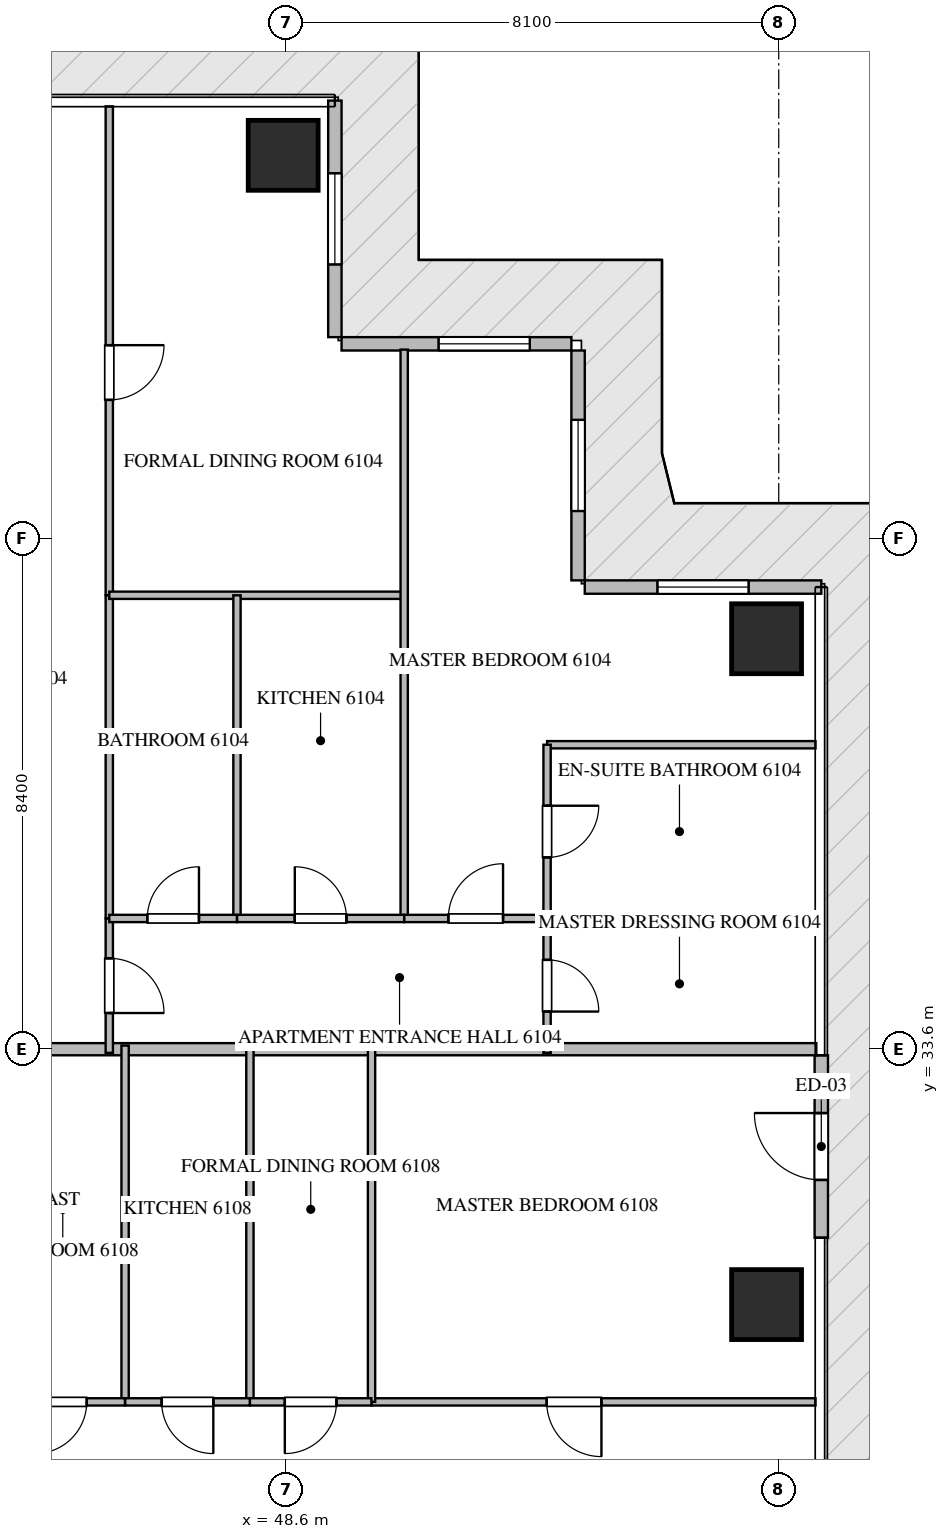
"""IFC4 building model, lengths in metres.
Left out: names, types, materials, properties, quantities, classifications, styles, units other than length and angle.
Written with IfcOpenShell. Run it as: python <this file> out.ifc"""

import sys

from ifc_helpers import new_model, si_unit, direction, frame, frame_2d, origin, origin_2d, place, context, subcontext, project, spatial, rectangle, extrude, source, transform, mapped, element, fill, save


model = new_model("IFC4")
c1 = context("Model", 3, precision=1e-05, world=origin(), true_north=direction((0.0, 1.0)))
c2 = subcontext(c1, "Body", "Model", "MODEL_VIEW")
j1 = project(units=[si_unit("LENGTHUNIT", "METRE"), si_unit("PLANEANGLEUNIT", "RADIAN")], contexts=[c1])
p1 = place(None, origin())
s1 = spatial("IfcSite", under=j1, at=p1, CompositionType="ELEMENT")
p2 = place(p1, origin())
s2 = spatial("IfcBuilding", under=s1, at=p2, CompositionType="ELEMENT")
p3 = place(p2, frame((0.0, 0.0, 245.1)))
s3 = spatial("IfcBuildingStorey", under=s2, at=p3, CompositionType="ELEMENT", Elevation=245.1)
m1 = source(origin(), c2, "Body", "SweptSolid", [
    extrude(rectangle(XDim=1.15, YDim=1.15, at=origin_2d()), origin(), (0.0, 0.0, 1.0), 3.85),
])
for number, where, z_axis, x_axis in (
    (1, (48.55, 48.3, -0.26), (0.0, 0.0, 1.0), (1.0, 0.0, 0.0)),
    (2, (56.5, 29.4, -0.26), (0.0, 0.0, 1.0), (1.0, 0.0, 0.0)),
    (3, (56.5, 40.35, -0.26), (0.0, 0.0, 1.0), (1.0, 0.0, 0.0)),
):
    element("IfcColumn", number, at=place(p3, frame(where, z_axis=z_axis, x_axis=x_axis)), inside=s3, PredefinedType="COLUMN", context=c2, shape_type="MappedRepresentation", body=[
        mapped(m1, transform((0.0, 0.0, 0.0), scale=1.0)),
    ])
p4 = place(p3, frame((57.4, 30.5, 0.0), z_axis=(0.0, 0.0, 1.0), x_axis=(0.0, 1.0, 0.0)))
e4 = element("IfcWall", 4, at=p4, inside=s3, PredefinedType="ELEMENTEDWALL", context=c2, shape_type="SweptSolid", body=[
    extrude(rectangle(XDim=3.0, YDim=0.22, at=frame_2d((1.5, 0.0))), origin(), (0.0, 0.0, 1.0), 3.575),
])
p5 = place(p4, frame((0.95, 0.0, 0.0)))
e5 = element("IfcOpeningElement", 5, at=p5, cuts=e4, PredefinedType="OPENING", context=c2, shape_type="SweptSolid", body=[
    extrude(rectangle(XDim=1.1, YDim=2.2, at=frame_2d((0.55, 1.1))), frame((0.0, 0.12, 0.0), z_axis=(0.0, -1.0, 0.0), x_axis=(1.0, 0.0, 0.0)), (0.0, 0.0, 1.0), 0.24),
])
p6 = place(p3, frame((57.4, 41.2, 0.0), z_axis=(0.0, 0.0, 1.0), x_axis=(-1.0, 0.0, 0.0)))
e6 = element("IfcWall", 6, at=p6, inside=s3, PredefinedType="ELEMENTEDWALL", context=c2, shape_type="SweptSolid", body=[
    extrude(rectangle(XDim=3.89, YDim=0.22, at=frame_2d((1.945, 0.0))), origin(), (0.0, 0.0, 1.0), 3.575),
])
p7 = place(p6, frame((1.195, 0.0, 0.65)))
e7 = element("IfcOpeningElement", 7, at=p7, cuts=e6, PredefinedType="OPENING", context=c2, shape_type="SweptSolid", body=[
    extrude(rectangle(XDim=1.5, YDim=2.25, at=frame_2d((0.75, 1.125))), frame((0.0, 0.12, 0.0), z_axis=(0.0, -1.0, 0.0), x_axis=(1.0, 0.0, 0.0)), (0.0, 0.0, 1.0), 0.24),
])
p8 = place(p3, frame((53.4, 41.31, 0.0), z_axis=(0.0, 0.0, 1.0), x_axis=(0.0, 1.0, 0.0)))
e8 = element("IfcWall", 8, at=p8, inside=s3, PredefinedType="ELEMENTEDWALL", context=c2, shape_type="SweptSolid", body=[
    extrude(rectangle(XDim=3.78, YDim=0.22, at=frame_2d((1.89, 0.0))), origin(), (0.0, 0.0, 1.0), 3.575),
])
p9 = place(p8, frame((1.14, 0.0, 0.65)))
e9 = element("IfcOpeningElement", 9, at=p9, cuts=e8, PredefinedType="OPENING", context=c2, shape_type="SweptSolid", body=[
    extrude(rectangle(XDim=1.5, YDim=2.25, at=frame_2d((0.75, 1.125))), frame((0.0, 0.12, 0.0), z_axis=(0.0, -1.0, 0.0), x_axis=(1.0, 0.0, 0.0)), (0.0, 0.0, 1.0), 0.24),
])
p10 = place(p3, frame((53.29, 45.2, 0.0), z_axis=(0.0, 0.0, 1.0), x_axis=(-1.0, 0.0, 0.0)))
e10 = element("IfcWall", 10, at=p10, inside=s3, PredefinedType="ELEMENTEDWALL", context=c2, shape_type="SweptSolid", body=[
    extrude(rectangle(XDim=3.78, YDim=0.22, at=frame_2d((1.89, 0.0))), origin(), (0.0, 0.0, 1.0), 3.575),
])
p11 = place(p10, frame((0.684, 0.0, 0.65)))
e11 = element("IfcOpeningElement", 11, at=p11, cuts=e10, PredefinedType="OPENING", context=c2, shape_type="SweptSolid", body=[
    extrude(rectangle(XDim=1.5, YDim=2.25, at=frame_2d((0.75, 1.125))), frame((0.0, 0.12, 0.0), z_axis=(0.0, -1.0, 0.0), x_axis=(1.0, 0.0, 0.0)), (0.0, 0.0, 1.0), 0.24),
])
p12 = place(p3, frame((49.4, 45.31, 0.0), z_axis=(0.0, 0.0, 1.0), x_axis=(0.0, 1.0, 0.0)))
e12 = element("IfcWall", 12, at=p12, inside=s3, PredefinedType="ELEMENTEDWALL", context=c2, shape_type="SweptSolid", body=[
    extrude(rectangle(XDim=3.89, YDim=0.22, at=frame_2d((1.945, 0.0))), origin(), (0.0, 0.0, 1.0), 3.575),
])
p13 = place(p12, frame((1.195, 0.0, 0.65)))
e13 = element("IfcOpeningElement", 13, at=p13, cuts=e12, PredefinedType="OPENING", context=c2, shape_type="SweptSolid", body=[
    extrude(rectangle(XDim=1.5, YDim=2.25, at=frame_2d((0.75, 1.125))), frame((0.0, 0.12, 0.0), z_axis=(0.0, -1.0, 0.0), x_axis=(1.0, 0.0, 0.0)), (0.0, 0.0, 1.0), 0.24),
])
p14 = place(p3, frame((43.9, 33.6, 0.0), z_axis=(0.0, 0.0, 1.0), x_axis=(1.0, 0.0, 0.0)))
e14 = element("IfcWall", 14, at=p14, inside=s3, PredefinedType="PARTITIONING", context=c2, shape_type="SweptSolid", body=[
    extrude(rectangle(XDim=13.418, YDim=0.2, at=frame_2d((6.709, 0.0))), origin(), (0.0, 0.0, 1.0), 3.59),
])
p15 = place(p3, frame((45.69, 35.75, 0.0), z_axis=(0.0, 0.0, 1.0), x_axis=(0.0, -1.0, 0.0)))
e15 = element("IfcWall", 15, at=p15, inside=s3, PredefinedType="PARTITIONING", context=c2, shape_type="SweptSolid", body=[
    extrude(rectangle(XDim=2.21, YDim=0.12, at=frame_2d((1.105, 0.0))), origin(), (0.0, 0.0, 1.0), 3.59),
])
p16 = place(p15, frame((0.655, 0.0, 0.0)))
e16 = element("IfcOpeningElement", 16, at=p16, cuts=e15, PredefinedType="OPENING", context=c2, shape_type="SweptSolid", body=[
    extrude(rectangle(XDim=0.9, YDim=2.1, at=frame_2d((0.45, 1.05))), frame((0.0, 0.07, 0.0), z_axis=(0.0, -1.0, 0.0), x_axis=(1.0, 0.0, 0.0)), (0.0, 0.0, 1.0), 0.14),
])
p17 = place(p3, frame((45.69, 49.105, 0.0), z_axis=(0.0, 0.0, 1.0), x_axis=(0.0, -1.0, 0.0)))
e17 = element("IfcWall", 17, at=p17, inside=s3, PredefinedType="PARTITIONING", context=c2, shape_type="SweptSolid", body=[
    extrude(rectangle(XDim=8.04, YDim=0.12, at=frame_2d((4.02, 0.0))), origin(), (0.0, 0.0, 1.0), 3.59),
])
p18 = place(p17, frame((3.927, 0.0, 0.0)))
e18 = element("IfcOpeningElement", 18, at=p18, cuts=e17, PredefinedType="OPENING", context=c2, shape_type="SweptSolid", body=[
    extrude(rectangle(XDim=0.9, YDim=2.1, at=frame_2d((0.45, 1.05))), frame((0.0, 0.07, 0.0), z_axis=(0.0, -1.0, 0.0), x_axis=(1.0, 0.0, 0.0)), (0.0, 0.0, 1.0), 0.14),
])
p19 = place(p3, frame((45.69, 41.063, 0.0), z_axis=(0.0, 0.0, 1.0), x_axis=(0.0, -1.0, 0.0)))
e19 = element("IfcWall", 19, at=p19, inside=s3, PredefinedType="PARTITIONING", context=c2, shape_type="SweptSolid", body=[
    extrude(rectangle(XDim=5.311, YDim=0.12, at=frame_2d((2.656, 0.0))), origin(), (0.0, 0.0, 1.0), 3.59),
])
p20 = place(p3, frame((45.69, 41.065, 0.0), z_axis=(0.0, 0.0, 1.0), x_axis=(1.0, 0.0, 0.0)))
e20 = element("IfcWall", 20, at=p20, inside=s3, PredefinedType="PARTITIONING", context=c2, shape_type="SweptSolid", body=[
    extrude(rectangle(XDim=4.85, YDim=0.12, at=frame_2d((2.425, 0.0))), origin(), (0.0, 0.0, 1.0), 3.59),
])
p21 = place(p3, frame((50.54, 45.105, 0.0), z_axis=(0.0, 0.0, 1.0), x_axis=(0.0, -1.0, 0.0)))
e21 = element("IfcWall", 21, at=p21, inside=s3, PredefinedType="PARTITIONING", context=c2, shape_type="SweptSolid", body=[
    extrude(rectangle(XDim=9.355, YDim=0.12, at=frame_2d((4.677, 0.0))), origin(), (0.0, 0.0, 1.0), 3.59),
])
p22 = place(p3, frame((47.79, 41.065, 0.0), z_axis=(0.0, 0.0, 1.0), x_axis=(0.0, -1.0, 0.0)))
e22 = element("IfcWall", 22, at=p22, inside=s3, PredefinedType="PARTITIONING", context=c2, shape_type="SweptSolid", body=[
    extrude(rectangle(XDim=5.315, YDim=0.12, at=frame_2d((2.657, 0.0))), origin(), (0.0, 0.0, 1.0), 3.59),
])
p23 = place(p3, frame((45.69, 35.75, 0.0), z_axis=(0.0, 0.0, 1.0), x_axis=(1.0, 0.0, 0.0)))
e23 = element("IfcWall", 23, at=p23, inside=s3, PredefinedType="PARTITIONING", context=c2, shape_type="SweptSolid", body=[
    extrude(rectangle(XDim=2.1, YDim=0.12, at=frame_2d((1.05, 0.0))), origin(), (0.0, 0.0, 1.0), 3.59),
])
p24 = place(p23, frame((0.625, 0.0, 0.0)))
e24 = element("IfcOpeningElement", 24, at=p24, cuts=e23, PredefinedType="OPENING", context=c2, shape_type="SweptSolid", body=[
    extrude(rectangle(XDim=0.85, YDim=2.1, at=frame_2d((0.425, 1.05))), frame((0.0, 0.07, 0.0), z_axis=(0.0, -1.0, 0.0), x_axis=(1.0, 0.0, 0.0)), (0.0, 0.0, 1.0), 0.14),
])
p25 = place(p3, frame((47.792, 35.75, 0.0), z_axis=(0.0, 0.0, 1.0), x_axis=(1.0, 0.0, 0.0)))
e25 = element("IfcWall", 25, at=p25, inside=s3, PredefinedType="PARTITIONING", context=c2, shape_type="SweptSolid", body=[
    extrude(rectangle(XDim=2.748, YDim=0.12, at=frame_2d((1.374, 0.0))), origin(), (0.0, 0.0, 1.0), 3.59),
])
p26 = place(p25, frame((0.949, 0.0, 0.0)))
e26 = element("IfcOpeningElement", 26, at=p26, cuts=e25, PredefinedType="OPENING", context=c2, shape_type="SweptSolid", body=[
    extrude(rectangle(XDim=0.85, YDim=2.1, at=frame_2d((0.425, 1.05))), frame((0.0, 0.07, 0.0), z_axis=(0.0, -1.0, 0.0), x_axis=(1.0, 0.0, 0.0)), (0.0, 0.0, 1.0), 0.14),
])
p27 = place(p3, frame((50.542, 35.75, 0.0), z_axis=(0.0, 0.0, 1.0), x_axis=(1.0, 0.0, 0.0)))
e27 = element("IfcWall", 27, at=p27, inside=s3, PredefinedType="PARTITIONING", context=c2, shape_type="SweptSolid", body=[
    extrude(rectangle(XDim=2.348, YDim=0.12, at=frame_2d((1.174, 0.0))), origin(), (0.0, 0.0, 1.0), 3.59),
])
p28 = place(p27, frame((0.724, 0.0, 0.0)))
e28 = element("IfcOpeningElement", 28, at=p28, cuts=e27, PredefinedType="OPENING", context=c2, shape_type="SweptSolid", body=[
    extrude(rectangle(XDim=0.9, YDim=2.1, at=frame_2d((0.45, 1.05))), frame((0.0, 0.07, 0.0), z_axis=(0.0, -1.0, 0.0), x_axis=(1.0, 0.0, 0.0)), (0.0, 0.0, 1.0), 0.14),
])
p29 = place(p3, frame((52.89, 38.607, 0.0), z_axis=(0.0, 0.0, 1.0), x_axis=(1.0, 0.0, 0.0)))
e29 = element("IfcWall", 29, at=p29, inside=s3, PredefinedType="PARTITIONING", context=c2, shape_type="SweptSolid", body=[
    extrude(rectangle(XDim=4.415, YDim=0.12, at=frame_2d((2.208, 0.0))), origin(), (0.0, 0.0, 1.0), 3.59),
])
p30 = place(p3, frame((52.892, 35.75, 0.0), z_axis=(0.0, 0.0, 1.0), x_axis=(1.0, 0.0, 0.0)))
e30 = element("IfcWall", 30, at=p30, inside=s3, PredefinedType="PARTITIONING", context=c2, shape_type="SweptSolid", body=[
    extrude(rectangle(XDim=4.413, YDim=0.12, at=frame_2d((2.207, 0.0))), origin(), (0.0, 0.0, 1.0), 3.59),
])
p31 = place(p3, frame((52.89, 38.607, 0.0), z_axis=(0.0, 0.0, 1.0), x_axis=(0.0, -1.0, 0.0)))
e31 = element("IfcWall", 31, at=p31, inside=s3, PredefinedType="PARTITIONING", context=c2, shape_type="SweptSolid", body=[
    extrude(rectangle(XDim=2.857, YDim=0.12, at=frame_2d((1.428, 0.0))), origin(), (0.0, 0.0, 1.0), 3.59),
])
p32 = place(p31, frame((1.003, 0.0, 0.0)))
e32 = element("IfcOpeningElement", 32, at=p32, cuts=e31, PredefinedType="OPENING", context=c2, shape_type="SweptSolid", body=[
    extrude(rectangle(XDim=0.85, YDim=2.1, at=frame_2d((0.425, 1.05))), frame((0.0, 0.07, 0.0), z_axis=(0.0, -1.0, 0.0), x_axis=(1.0, 0.0, 0.0)), (0.0, 0.0, 1.0), 0.14),
])
p33 = place(p3, frame((52.89, 35.748, 0.0), z_axis=(0.0, 0.0, 1.0), x_axis=(0.0, -1.0, 0.0)))
e33 = element("IfcWall", 33, at=p33, inside=s3, PredefinedType="PARTITIONING", context=c2, shape_type="SweptSolid", body=[
    extrude(rectangle(XDim=2.208, YDim=0.12, at=frame_2d((1.104, 0.0))), origin(), (0.0, 0.0, 1.0), 3.59),
])
p34 = place(p33, frame((0.679, 0.0, 0.0)))
e34 = element("IfcOpeningElement", 34, at=p34, cuts=e33, PredefinedType="OPENING", context=c2, shape_type="SweptSolid", body=[
    extrude(rectangle(XDim=0.85, YDim=2.1, at=frame_2d((0.425, 1.05))), frame((0.0, 0.07, 0.0), z_axis=(0.0, -1.0, 0.0), x_axis=(1.0, 0.0, 0.0)), (0.0, 0.0, 1.0), 0.14),
])
p35 = place(p3, frame((57.305, 27.8, 0.0), z_axis=(0.0, 0.0, 1.0), x_axis=(-1.0, 0.0, 0.0)))
e35 = element("IfcWall", 35, at=p35, inside=s3, PredefinedType="PARTITIONING", context=c2, shape_type="SweptSolid", body=[
    extrude(rectangle(XDim=7.302, YDim=0.12, at=frame_2d((3.651, 0.0))), origin(), (0.0, 0.0, 1.0), 3.59),
])
p36 = place(p35, frame((3.521, 0.0, 0.0)))
e36 = element("IfcOpeningElement", 36, at=p36, cuts=e35, PredefinedType="OPENING", context=c2, shape_type="SweptSolid", body=[
    extrude(rectangle(XDim=0.9, YDim=2.1, at=frame_2d((0.45, 1.05))), frame((0.0, 0.07, 0.0), z_axis=(0.0, -1.0, 0.0), x_axis=(1.0, 0.0, 0.0)), (0.0, 0.0, 1.0), 0.14),
])
for number, where, z_axis, x_axis in (
    (37, (50.003, 27.8, 0.0), (0.0, 0.0, 1.0), (0.0, 1.0, 0.0)),
    (38, (48.003, 27.8, 0.0), (0.0, 0.0, 1.0), (0.0, 1.0, 0.0)),
    (39, (45.95, 27.8, 0.0), (0.0, 0.0, 1.0), (0.0, 1.0, 0.0)),
):
    element("IfcWall", number, at=place(p3, frame(where, z_axis=z_axis, x_axis=x_axis)), inside=s3, PredefinedType="PARTITIONING", context=c2, shape_type="SweptSolid", body=[
        extrude(rectangle(XDim=5.86, YDim=0.12, at=frame_2d((2.93, 0.0))), origin(), (0.0, 0.0, 1.0), 3.59),
    ])
p37 = place(p3, frame((50.001, 27.8, 0.0), z_axis=(0.0, 0.0, 1.0), x_axis=(-1.0, 0.0, 0.0)))
e40 = element("IfcWall", 40, at=p37, inside=s3, PredefinedType="PARTITIONING", context=c2, shape_type="SweptSolid", body=[
    extrude(rectangle(XDim=1.998, YDim=0.12, at=frame_2d((0.999, 0.0))), origin(), (0.0, 0.0, 1.0), 3.59),
])
p38 = place(p37, frame((0.574, 0.0, 0.0)))
e41 = element("IfcOpeningElement", 41, at=p38, cuts=e40, PredefinedType="OPENING", context=c2, shape_type="SweptSolid", body=[
    extrude(rectangle(XDim=0.85, YDim=2.1, at=frame_2d((0.425, 1.05))), frame((0.0, 0.07, 0.0), z_axis=(0.0, -1.0, 0.0), x_axis=(1.0, 0.0, 0.0)), (0.0, 0.0, 1.0), 0.14),
])
p39 = place(p3, frame((48.001, 27.8, 0.0), z_axis=(0.0, 0.0, 1.0), x_axis=(-1.0, 0.0, 0.0)))
e42 = element("IfcWall", 42, at=p39, inside=s3, PredefinedType="PARTITIONING", context=c2, shape_type="SweptSolid", body=[
    extrude(rectangle(XDim=2.051, YDim=0.12, at=frame_2d((1.025, 0.0))), origin(), (0.0, 0.0, 1.0), 3.59),
])
p40 = place(p39, frame((0.6, 0.0, 0.0)))
e43 = element("IfcOpeningElement", 43, at=p40, cuts=e42, PredefinedType="OPENING", context=c2, shape_type="SweptSolid", body=[
    extrude(rectangle(XDim=0.85, YDim=2.1, at=frame_2d((0.425, 1.05))), frame((0.0, 0.07, 0.0), z_axis=(0.0, -1.0, 0.0), x_axis=(1.0, 0.0, 0.0)), (0.0, 0.0, 1.0), 0.14),
])
p41 = place(p3, frame((45.948, 27.8, 0.0), z_axis=(0.0, 0.0, 1.0), x_axis=(-1.0, 0.0, 0.0)))
e44 = element("IfcWall", 44, at=p41, inside=s3, PredefinedType="PARTITIONING", context=c2, shape_type="SweptSolid", body=[
    extrude(rectangle(XDim=2.108, YDim=0.12, at=frame_2d((1.054, 0.0))), origin(), (0.0, 0.0, 1.0), 3.59),
])
p42 = place(p41, frame((0.629, 0.0, 0.0)))
e45 = element("IfcOpeningElement", 45, at=p42, cuts=e44, PredefinedType="OPENING", context=c2, shape_type="SweptSolid", body=[
    extrude(rectangle(XDim=0.85, YDim=2.1, at=frame_2d((0.425, 1.05))), frame((0.0, 0.07, 0.0), z_axis=(0.0, -1.0, 0.0), x_axis=(1.0, 0.0, 0.0)), (0.0, 0.0, 1.0), 0.14),
])
m2 = source(origin(), c2, "Body", "SweptSolid", [
    extrude(rectangle(XDim=1.1, YDim=2.2, at=frame_2d((0.55, 1.1))), frame((0.0, 0.025, 0.0), z_axis=(0.0, -1.0, 0.0), x_axis=(1.0, 0.0, 0.0)), (0.0, 0.0, 1.0), 0.05),
])
p43 = place(p5, origin())
e46 = element("IfcDoor", 46, at=p43, inside=s3, OperationType="SINGLE_SWING_RIGHT", PredefinedType="DOOR", context=c2, shape_type="MappedRepresentation", body=[
    mapped(m2, transform((0.0, 0.0, 0.0), scale=1.0)),
])
fill(e5, e46)
m3 = source(origin(), c2, "Body", "SweptSolid", [
    extrude(rectangle(XDim=1.5, YDim=2.25, at=frame_2d((0.75, 1.125))), frame((0.0, 0.03, 0.0), z_axis=(0.0, -1.0, 0.0), x_axis=(1.0, 0.0, 0.0)), (0.0, 0.0, 1.0), 0.06),
])
p44 = place(p7, origin())
e47 = element("IfcWindow", 47, at=p44, inside=s3, PartitioningType="SINGLE_PANEL", PredefinedType="WINDOW", context=c2, shape_type="MappedRepresentation", body=[
    mapped(m3, transform((0.0, 0.0, 0.0), scale=1.0)),
])
fill(e7, e47)
p45 = place(p9, origin())
e48 = element("IfcWindow", 48, at=p45, inside=s3, PartitioningType="SINGLE_PANEL", PredefinedType="WINDOW", context=c2, shape_type="MappedRepresentation", body=[
    mapped(m3, transform((0.0, 0.0, 0.0), scale=1.0)),
])
fill(e9, e48)
p46 = place(p11, origin())
e49 = element("IfcWindow", 49, at=p46, inside=s3, PartitioningType="SINGLE_PANEL", PredefinedType="WINDOW", context=c2, shape_type="MappedRepresentation", body=[
    mapped(m3, transform((0.0, 0.0, 0.0), scale=1.0)),
])
fill(e11, e49)
p47 = place(p13, origin())
e50 = element("IfcWindow", 50, at=p47, inside=s3, PartitioningType="SINGLE_PANEL", PredefinedType="WINDOW", context=c2, shape_type="MappedRepresentation", body=[
    mapped(m3, transform((0.0, 0.0, 0.0), scale=1.0)),
])
fill(e13, e50)
m4 = source(origin(), c2, "Body", "SweptSolid", [
    extrude(rectangle(XDim=0.9, YDim=2.1, at=frame_2d((0.45, 1.05))), frame((0.0, 0.025, 0.0), z_axis=(0.0, -1.0, 0.0), x_axis=(1.0, 0.0, 0.0)), (0.0, 0.0, 1.0), 0.05),
])
p48 = place(p16, origin())
e51 = element("IfcDoor", 51, at=p48, inside=s3, OperationType="SINGLE_SWING_RIGHT", PredefinedType="DOOR", context=c2, shape_type="MappedRepresentation", body=[
    mapped(m4, transform((0.0, 0.0, 0.0), scale=1.0)),
])
fill(e16, e51)
p49 = place(p18, origin())
e52 = element("IfcDoor", 52, at=p49, inside=s3, OperationType="SINGLE_SWING_LEFT", PredefinedType="DOOR", context=c2, shape_type="MappedRepresentation", body=[
    mapped(m4, transform((0.0, 0.0, 0.0), scale=1.0)),
])
fill(e18, e52)
m5 = source(origin(), c2, "Body", "SweptSolid", [
    extrude(rectangle(XDim=0.85, YDim=2.1, at=frame_2d((0.425, 1.05))), frame((0.0, 0.025, 0.0), z_axis=(0.0, -1.0, 0.0), x_axis=(1.0, 0.0, 0.0)), (0.0, 0.0, 1.0), 0.05),
])
p50 = place(p24, origin())
e53 = element("IfcDoor", 53, at=p50, inside=s3, OperationType="SINGLE_SWING_RIGHT", PredefinedType="DOOR", context=c2, shape_type="MappedRepresentation", body=[
    mapped(m5, transform((0.0, 0.0, 0.0), scale=1.0)),
])
fill(e24, e53)
p51 = place(p26, origin())
e54 = element("IfcDoor", 54, at=p51, inside=s3, OperationType="SINGLE_SWING_LEFT", PredefinedType="DOOR", context=c2, shape_type="MappedRepresentation", body=[
    mapped(m5, transform((0.0, 0.0, 0.0), scale=1.0)),
])
fill(e26, e54)
p52 = place(p28, origin())
e55 = element("IfcDoor", 55, at=p52, inside=s3, OperationType="SINGLE_SWING_RIGHT", PredefinedType="DOOR", context=c2, shape_type="MappedRepresentation", body=[
    mapped(m4, transform((0.0, 0.0, 0.0), scale=1.0)),
])
fill(e28, e55)
p53 = place(p32, origin())
e56 = element("IfcDoor", 56, at=p53, inside=s3, OperationType="SINGLE_SWING_LEFT", PredefinedType="DOOR", context=c2, shape_type="MappedRepresentation", body=[
    mapped(m5, transform((0.0, 0.0, 0.0), scale=1.0)),
])
fill(e32, e56)
p54 = place(p34, origin())
e57 = element("IfcDoor", 57, at=p54, inside=s3, OperationType="SINGLE_SWING_RIGHT", PredefinedType="DOOR", context=c2, shape_type="MappedRepresentation", body=[
    mapped(m5, transform((0.0, 0.0, 0.0), scale=1.0)),
])
fill(e34, e57)
p55 = place(p36, origin())
e58 = element("IfcDoor", 58, at=p55, inside=s3, OperationType="SINGLE_SWING_LEFT", PredefinedType="DOOR", context=c2, shape_type="MappedRepresentation", body=[
    mapped(m4, transform((0.0, 0.0, 0.0), scale=1.0)),
])
fill(e36, e58)
p56 = place(p38, origin())
e59 = element("IfcDoor", 59, at=p56, inside=s3, OperationType="SINGLE_SWING_RIGHT", PredefinedType="DOOR", context=c2, shape_type="MappedRepresentation", body=[
    mapped(m5, transform((0.0, 0.0, 0.0), scale=1.0)),
])
fill(e41, e59)
p57 = place(p40, origin())
e60 = element("IfcDoor", 60, at=p57, inside=s3, OperationType="SINGLE_SWING_LEFT", PredefinedType="DOOR", context=c2, shape_type="MappedRepresentation", body=[
    mapped(m5, transform((0.0, 0.0, 0.0), scale=1.0)),
])
fill(e43, e60)
p58 = place(p42, origin())
e61 = element("IfcDoor", 61, at=p58, inside=s3, OperationType="SINGLE_SWING_RIGHT", PredefinedType="DOOR", context=c2, shape_type="MappedRepresentation", body=[
    mapped(m5, transform((0.0, 0.0, 0.0), scale=1.0)),
])
fill(e45, e61)
save(model, sys.argv[1])
